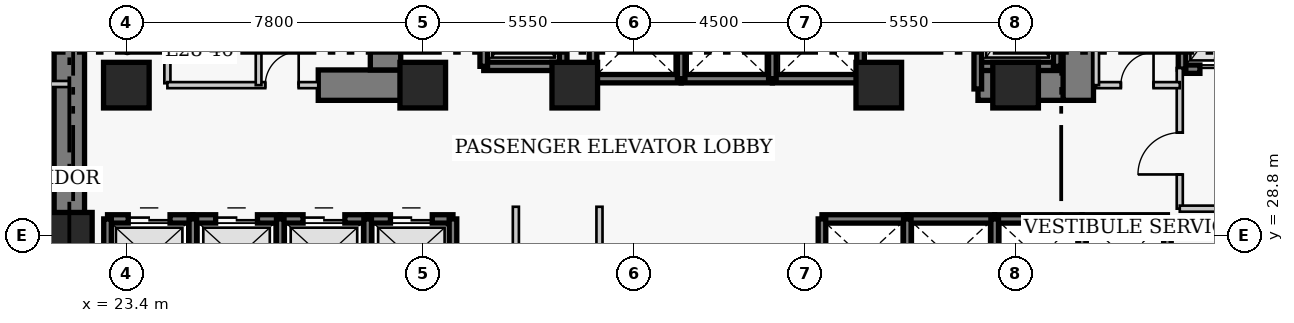
"""IFC4 building model, lengths in metres.
Left out: names, types, materials, properties, quantities, classifications, styles, units other than length and angle.
Written with IfcOpenShell. Run it as: python <this file> out.ifc"""

import sys

from ifc_helpers import new_model, si_unit, direction, frame, frame_2d, origin, origin_2d, place, context, subcontext, project, spatial, rectangle, extrude, element, fill, save


model = new_model("IFC4")
c1 = context("Model", 3, precision=1e-05, world=origin(), true_north=direction((0.0, 1.0)))
c2 = subcontext(c1, "Body", "Model", "MODEL_VIEW")
j1 = project(units=[si_unit("LENGTHUNIT", "METRE"), si_unit("PLANEANGLEUNIT", "RADIAN")], contexts=[c1])
p1 = place(None, origin())
s1 = spatial("IfcSite", under=j1, at=p1, CompositionType="ELEMENT")
p2 = place(p1, origin())
s2 = spatial("IfcBuilding", under=s1, at=p2, CompositionType="ELEMENT")
p3 = place(p2, frame((0.0, 0.0, 114.6)))
s3 = spatial("IfcBuildingStorey", under=s2, at=p3, CompositionType="ELEMENT", Elevation=114.6)
p4 = place(p3, frame((21.9, 27.05, 0.0), z_axis=(0.0, 0.0, 1.0), x_axis=(0.0, 1.0, 0.0)))
e1 = element("IfcWall", 1, at=p4, inside=s3, PredefinedType="SHEAR", context=c2, shape_type="SweptSolid", body=[
    extrude(rectangle(XDim=13.67, YDim=0.8, at=frame_2d((6.835, 0.0))), origin(), (0.0, 0.0, 1.0), 3.8),
])
p5 = place(p3, frame((28.45, 32.75, 0.0), z_axis=(0.0, 0.0, 1.0), x_axis=(1.0, 0.0, 0.0)))
e2 = element("IfcWall", 2, at=p5, inside=s3, PredefinedType="SHEAR", context=c2, shape_type="SweptSolid", body=[
    extrude(rectangle(XDim=2.4, YDim=0.8, at=frame_2d((1.2, 0.0))), origin(), (0.0, 0.0, 1.0), 3.8),
])
p6 = place(p3, frame((45.81, 32.75, 0.0), z_axis=(0.0, 0.0, 1.0), x_axis=(1.0, 0.0, 0.0)))
e3 = element("IfcWall", 3, at=p6, inside=s3, PredefinedType="SHEAR", context=c2, shape_type="SweptSolid", body=[
    extrude(rectangle(XDim=2.64, YDim=0.8, at=frame_2d((1.32, 0.0))), origin(), (0.0, 0.0, 1.0), 3.8),
])
p7 = place(p3, frame((30.22, 33.15, 0.0), z_axis=(0.0, 0.0, 1.0), x_axis=(0.0, 1.0, 0.0)))
e4 = element("IfcWall", 4, at=p7, inside=s3, PredefinedType="SHEAR", context=c2, shape_type="SweptSolid", body=[
    extrude(rectangle(XDim=7.17, YDim=0.8, at=frame_2d((3.585, 0.0))), origin(), (0.0, 0.0, 1.0), 3.8),
])
p8 = place(p3, frame((48.45, 32.35, 0.0), z_axis=(0.0, 0.0, 1.0), x_axis=(0.0, 1.0, 0.0)))
e5 = element("IfcWall", 5, at=p8, inside=s3, PredefinedType="SHEAR", context=c2, shape_type="SweptSolid", body=[
    extrude(rectangle(XDim=7.97, YDim=0.8, at=frame_2d((3.985, 0.0))), origin(), (0.0, 0.0, 1.0), 3.8),
])
p9 = place(p8, frame((5.85, 0.0, 0.0)))
e6 = element("IfcOpeningElement", 6, at=p9, cuts=e5, PredefinedType="OPENING", context=c2, shape_type="SweptSolid", body=[
    extrude(rectangle(XDim=1.1, YDim=2.15, at=frame_2d((0.55, 1.075))), frame((0.0, 0.41, 0.0), z_axis=(0.0, -1.0, 0.0), x_axis=(1.0, 0.0, 0.0)), (0.0, 0.0, 1.0), 0.82),
])
for number, where, z_axis, x_axis in (
    (7, (21.9, 28.8, 0.0), (0.0, 0.0, 1.0), (1.0, 0.0, 0.0)),
    (8, (23.4, 32.75, 0.0), (0.0, 0.0, 1.0), (1.0, 0.0, 0.0)),
    (9, (31.2, 32.75, 0.0), (0.0, 0.0, 1.0), (1.0, 0.0, 0.0)),
    (10, (35.2, 32.75, 0.0), (0.0, 0.0, 1.0), (1.0, 0.0, 0.0)),
    (11, (43.2, 32.75, 0.0), (0.0, 0.0, 1.0), (1.0, 0.0, 0.0)),
    (12, (46.8, 32.75, 0.0), (0.0, 0.0, 1.0), (1.0, 0.0, 0.0)),
):
    element("IfcColumn", number, at=place(p3, frame(where, z_axis=z_axis, x_axis=x_axis)), inside=s3, PredefinedType="COLUMN", context=c2, shape_type="SweptSolid", body=[
        extrude(rectangle(XDim=1.2, YDim=1.2, at=origin_2d()), origin(), (0.0, 0.0, 1.0), 3.8),
    ])
p10 = place(p3, frame((22.905, 29.23, 0.0), z_axis=(0.0, 0.0, 1.0), x_axis=(1.0, 0.0, 0.0)))
e13 = element("IfcWall", 13, at=p10, inside=s3, PredefinedType="SHEAR", context=c2, shape_type="SweptSolid", body=[
    extrude(rectangle(XDim=2.245, YDim=0.22, at=frame_2d((1.123, 0.0))), origin(), (0.0, 0.0, 1.0), 3.8),
])
p11 = place(p10, frame((0.545, 0.0, 0.0)))
e14 = element("IfcOpeningElement", 14, at=p11, cuts=e13, PredefinedType="OPENING", context=c2, shape_type="SweptSolid", body=[
    extrude(rectangle(XDim=1.1, YDim=2.15, at=frame_2d((0.55, 1.075))), frame((0.0, 0.12, 0.0), z_axis=(0.0, -1.0, 0.0), x_axis=(1.0, 0.0, 0.0)), (0.0, 0.0, 1.0), 0.24),
])
p12 = place(p3, frame((22.905, 27.17, 0.0), z_axis=(0.0, 0.0, 1.0), x_axis=(0.0, 1.0, 0.0)))
e15 = element("IfcWall", 15, at=p12, inside=s3, PredefinedType="SHEAR", context=c2, shape_type="SweptSolid", body=[
    extrude(rectangle(XDim=2.06, YDim=0.2, at=frame_2d((1.03, 0.0))), origin(), (0.0, 0.0, 1.0), 3.8),
])
p13 = place(p3, frame((25.15, 29.23, 0.0), z_axis=(0.0, 0.0, 1.0), x_axis=(1.0, 0.0, 0.0)))
e16 = element("IfcWall", 16, at=p13, inside=s3, PredefinedType="SHEAR", context=c2, shape_type="SweptSolid", body=[
    extrude(rectangle(XDim=2.3, YDim=0.22, at=frame_2d((1.15, 0.0))), origin(), (0.0, 0.0, 1.0), 3.8),
])
p14 = place(p13, frame((0.6, 0.0, 0.0)))
e17 = element("IfcOpeningElement", 17, at=p14, cuts=e16, PredefinedType="OPENING", context=c2, shape_type="SweptSolid", body=[
    extrude(rectangle(XDim=1.1, YDim=2.15, at=frame_2d((0.55, 1.075))), frame((0.0, 0.12, 0.0), z_axis=(0.0, -1.0, 0.0), x_axis=(1.0, 0.0, 0.0)), (0.0, 0.0, 1.0), 0.24),
])
p15 = place(p3, frame((25.15, 27.17, 0.0), z_axis=(0.0, 0.0, 1.0), x_axis=(0.0, 1.0, 0.0)))
e18 = element("IfcWall", 18, at=p15, inside=s3, PredefinedType="SHEAR", context=c2, shape_type="SweptSolid", body=[
    extrude(rectangle(XDim=2.06, YDim=0.2, at=frame_2d((1.03, 0.0))), origin(), (0.0, 0.0, 1.0), 3.8),
])
p16 = place(p3, frame((27.45, 29.23, 0.0), z_axis=(0.0, 0.0, 1.0), x_axis=(1.0, 0.0, 0.0)))
e19 = element("IfcWall", 19, at=p16, inside=s3, PredefinedType="SHEAR", context=c2, shape_type="SweptSolid", body=[
    extrude(rectangle(XDim=2.3, YDim=0.22, at=frame_2d((1.15, 0.0))), origin(), (0.0, 0.0, 1.0), 3.8),
])
p17 = place(p16, frame((0.6, 0.0, 0.0)))
e20 = element("IfcOpeningElement", 20, at=p17, cuts=e19, PredefinedType="OPENING", context=c2, shape_type="SweptSolid", body=[
    extrude(rectangle(XDim=1.1, YDim=2.15, at=frame_2d((0.55, 1.075))), frame((0.0, 0.12, 0.0), z_axis=(0.0, -1.0, 0.0), x_axis=(1.0, 0.0, 0.0)), (0.0, 0.0, 1.0), 0.24),
])
p18 = place(p3, frame((27.45, 27.17, 0.0), z_axis=(0.0, 0.0, 1.0), x_axis=(0.0, 1.0, 0.0)))
e21 = element("IfcWall", 21, at=p18, inside=s3, PredefinedType="SHEAR", context=c2, shape_type="SweptSolid", body=[
    extrude(rectangle(XDim=2.06, YDim=0.2, at=frame_2d((1.03, 0.0))), origin(), (0.0, 0.0, 1.0), 3.8),
])
p19 = place(p3, frame((29.75, 29.23, 0.0), z_axis=(0.0, 0.0, 1.0), x_axis=(1.0, 0.0, 0.0)))
e22 = element("IfcWall", 22, at=p19, inside=s3, PredefinedType="SHEAR", context=c2, shape_type="SweptSolid", body=[
    extrude(rectangle(XDim=2.245, YDim=0.22, at=frame_2d((1.123, 0.0))), origin(), (0.0, 0.0, 1.0), 3.8),
])
p20 = place(p19, frame((0.6, 0.0, 0.0)))
e23 = element("IfcOpeningElement", 23, at=p20, cuts=e22, PredefinedType="OPENING", context=c2, shape_type="SweptSolid", body=[
    extrude(rectangle(XDim=1.1, YDim=2.15, at=frame_2d((0.55, 1.075))), frame((0.0, 0.12, 0.0), z_axis=(0.0, -1.0, 0.0), x_axis=(1.0, 0.0, 0.0)), (0.0, 0.0, 1.0), 0.24),
])
for number, where, z_axis, x_axis in (
    (24, (29.75, 27.17, 0.0), (0.0, 0.0, 1.0), (0.0, 1.0, 0.0)),
    (25, (31.995, 27.17, 0.0), (0.0, 0.0, 1.0), (0.0, 1.0, 0.0)),
):
    element("IfcWall", number, at=place(p3, frame(where, z_axis=z_axis, x_axis=x_axis)), inside=s3, PredefinedType="SHEAR", context=c2, shape_type="SweptSolid", body=[
        extrude(rectangle(XDim=2.06, YDim=0.2, at=frame_2d((1.03, 0.0))), origin(), (0.0, 0.0, 1.0), 3.8),
    ])
p21 = place(p3, frame((41.705, 29.23, 0.0), z_axis=(0.0, 0.0, 1.0), x_axis=(1.0, 0.0, 0.0)))
e26 = element("IfcWall", 26, at=p21, inside=s3, PredefinedType="SHEAR", context=c2, shape_type="SweptSolid", body=[
    extrude(rectangle(XDim=2.245, YDim=0.22, at=frame_2d((1.123, 0.0))), origin(), (0.0, 0.0, 1.0), 3.8),
])
p22 = place(p3, frame((41.705, 27.17, 0.0), z_axis=(0.0, 0.0, 1.0), x_axis=(0.0, 1.0, 0.0)))
e27 = element("IfcWall", 27, at=p22, inside=s3, PredefinedType="SHEAR", context=c2, shape_type="SweptSolid", body=[
    extrude(rectangle(XDim=2.06, YDim=0.2, at=frame_2d((1.03, 0.0))), origin(), (0.0, 0.0, 1.0), 3.8),
])
p23 = place(p3, frame((43.95, 29.23, 0.0), z_axis=(0.0, 0.0, 1.0), x_axis=(1.0, 0.0, 0.0)))
e28 = element("IfcWall", 28, at=p23, inside=s3, PredefinedType="SHEAR", context=c2, shape_type="SweptSolid", body=[
    extrude(rectangle(XDim=2.3, YDim=0.22, at=frame_2d((1.15, 0.0))), origin(), (0.0, 0.0, 1.0), 3.8),
])
p24 = place(p3, frame((43.95, 27.17, 0.0), z_axis=(0.0, 0.0, 1.0), x_axis=(0.0, 1.0, 0.0)))
e29 = element("IfcWall", 29, at=p24, inside=s3, PredefinedType="SHEAR", context=c2, shape_type="SweptSolid", body=[
    extrude(rectangle(XDim=2.06, YDim=0.2, at=frame_2d((1.03, 0.0))), origin(), (0.0, 0.0, 1.0), 3.8),
])
p25 = place(p3, frame((46.25, 29.23, 0.0), z_axis=(0.0, 0.0, 1.0), x_axis=(1.0, 0.0, 0.0)))
e30 = element("IfcWall", 30, at=p25, inside=s3, PredefinedType="SHEAR", context=c2, shape_type="SweptSolid", body=[
    extrude(rectangle(XDim=2.3, YDim=0.22, at=frame_2d((1.15, 0.0))), origin(), (0.0, 0.0, 1.0), 3.8),
])
p26 = place(p3, frame((46.25, 27.17, 0.0), z_axis=(0.0, 0.0, 1.0), x_axis=(0.0, 1.0, 0.0)))
e31 = element("IfcWall", 31, at=p26, inside=s3, PredefinedType="SHEAR", context=c2, shape_type="SweptSolid", body=[
    extrude(rectangle(XDim=2.06, YDim=0.2, at=frame_2d((1.03, 0.0))), origin(), (0.0, 0.0, 1.0), 3.8),
])
p27 = place(p3, frame((48.55, 29.23, 0.0), z_axis=(0.0, 0.0, 1.0), x_axis=(1.0, 0.0, 0.0)))
e32 = element("IfcWall", 32, at=p27, inside=s3, PredefinedType="SHEAR", context=c2, shape_type="SweptSolid", body=[
    extrude(rectangle(XDim=2.245, YDim=0.22, at=frame_2d((1.123, 0.0))), origin(), (0.0, 0.0, 1.0), 3.8),
])
for number, where, z_axis, x_axis in (
    (33, (48.55, 27.17, 0.0), (0.0, 0.0, 1.0), (0.0, 1.0, 0.0)),
    (34, (50.795, 27.17, 0.0), (0.0, 0.0, 1.0), (0.0, 1.0, 0.0)),
):
    element("IfcWall", number, at=place(p3, frame(where, z_axis=z_axis, x_axis=x_axis)), inside=s3, PredefinedType="SHEAR", context=c2, shape_type="SweptSolid", body=[
        extrude(rectangle(XDim=2.06, YDim=0.2, at=frame_2d((1.03, 0.0))), origin(), (0.0, 0.0, 1.0), 3.8),
    ])
p28 = place(p3, frame((35.68, 32.92, 0.0), z_axis=(0.0, 0.0, 1.0), x_axis=(1.0, 0.0, 0.0)))
e35 = element("IfcWall", 35, at=p28, inside=s3, PredefinedType="SHEAR", context=c2, shape_type="SweptSolid", body=[
    extrude(rectangle(XDim=2.32, YDim=0.22, at=frame_2d((1.16, 0.0))), origin(), (0.0, 0.0, 1.0), 3.8),
])
p29 = place(p3, frame((35.68, 32.92, 0.0), z_axis=(0.0, 0.0, 1.0), x_axis=(0.0, 1.0, 0.0)))
e36 = element("IfcWall", 36, at=p29, inside=s3, PredefinedType="SHEAR", context=c2, shape_type="SweptSolid", body=[
    extrude(rectangle(XDim=2.16, YDim=0.2, at=frame_2d((1.08, 0.0))), origin(), (0.0, 0.0, 1.0), 3.8),
])
p30 = place(p3, frame((38.0, 32.92, 0.0), z_axis=(0.0, 0.0, 1.0), x_axis=(1.0, 0.0, 0.0)))
e37 = element("IfcWall", 37, at=p30, inside=s3, PredefinedType="SHEAR", context=c2, shape_type="SweptSolid", body=[
    extrude(rectangle(XDim=2.4, YDim=0.22, at=frame_2d((1.2, 0.0))), origin(), (0.0, 0.0, 1.0), 3.8),
])
p31 = place(p3, frame((38.0, 32.92, 0.0), z_axis=(0.0, 0.0, 1.0), x_axis=(0.0, 1.0, 0.0)))
e38 = element("IfcWall", 38, at=p31, inside=s3, PredefinedType="SHEAR", context=c2, shape_type="SweptSolid", body=[
    extrude(rectangle(XDim=2.16, YDim=0.2, at=frame_2d((1.08, 0.0))), origin(), (0.0, 0.0, 1.0), 3.8),
])
p32 = place(p3, frame((40.4, 32.92, 0.0), z_axis=(0.0, 0.0, 1.0), x_axis=(1.0, 0.0, 0.0)))
e39 = element("IfcWall", 39, at=p32, inside=s3, PredefinedType="SHEAR", context=c2, shape_type="SweptSolid", body=[
    extrude(rectangle(XDim=2.32, YDim=0.22, at=frame_2d((1.16, 0.0))), origin(), (0.0, 0.0, 1.0), 3.8),
])
for number, where, z_axis, x_axis in (
    (40, (40.4, 32.92, 0.0), (0.0, 0.0, 1.0), (0.0, 1.0, 0.0)),
    (41, (42.72, 32.92, 0.0), (0.0, 0.0, 1.0), (0.0, 1.0, 0.0)),
):
    element("IfcWall", number, at=place(p3, frame(where, z_axis=z_axis, x_axis=x_axis)), inside=s3, PredefinedType="SHEAR", context=c2, shape_type="SweptSolid", body=[
        extrude(rectangle(XDim=2.16, YDim=0.2, at=frame_2d((1.08, 0.0))), origin(), (0.0, 0.0, 1.0), 3.8),
    ])
p33 = place(p3, frame((51.18, 33.17, 0.0), z_axis=(0.0, 0.0, 1.0), x_axis=(1.0, 0.0, 0.0)))
e42 = element("IfcWall", 42, at=p33, inside=s3, PredefinedType="SHEAR", context=c2, shape_type="SweptSolid", body=[
    extrude(rectangle(XDim=2.42, YDim=0.22, at=frame_2d((1.21, 0.0))), origin(), (0.0, 0.0, 1.0), 3.8),
])
p34 = place(p33, frame((0.47, 0.0, 0.0)))
e43 = element("IfcOpeningElement", 43, at=p34, cuts=e42, PredefinedType="OPENING", context=c2, shape_type="SweptSolid", body=[
    extrude(rectangle(XDim=1.3, YDim=2.15, at=frame_2d((0.65, 1.075))), frame((0.0, 0.12, 0.0), z_axis=(0.0, -1.0, 0.0), x_axis=(1.0, 0.0, 0.0)), (0.0, 0.0, 1.0), 0.24),
])
p35 = place(p3, frame((51.18, 33.17, 0.0), z_axis=(0.0, 0.0, 1.0), x_axis=(0.0, 1.0, 0.0)))
e44 = element("IfcWall", 44, at=p35, inside=s3, PredefinedType="SHEAR", context=c2, shape_type="SweptSolid", body=[
    extrude(rectangle(XDim=2.86, YDim=0.2, at=frame_2d((1.43, 0.0))), origin(), (0.0, 0.0, 1.0), 3.8),
])
p36 = place(p3, frame((32.805, 33.245, 0.0), z_axis=(0.0, 0.0, 1.0), x_axis=(1.0, 0.0, 0.0)))
e45 = element("IfcWall", 45, at=p36, inside=s3, PredefinedType="SHEAR", context=c2, shape_type="SweptSolid", body=[
    extrude(rectangle(XDim=2.09, YDim=0.22, at=frame_2d((1.045, 0.0))), origin(), (0.0, 0.0, 1.0), 3.8),
])
for number, where, z_axis, x_axis in (
    (46, (32.805, 33.245, 0.0), (0.0, 0.0, 1.0), (0.0, 1.0, 0.0)),
    (47, (34.895, 33.245, 0.0), (0.0, 0.0, 1.0), (0.0, 1.0, 0.0)),
):
    element("IfcWall", number, at=place(p3, frame(where, z_axis=z_axis, x_axis=x_axis)), inside=s3, PredefinedType="SHEAR", context=c2, shape_type="SweptSolid", body=[
        extrude(rectangle(XDim=2.91, YDim=0.2, at=frame_2d((1.455, 0.0))), origin(), (0.0, 0.0, 1.0), 3.8),
    ])
p37 = place(p3, frame((45.805, 33.245, 0.0), z_axis=(0.0, 0.0, 1.0), x_axis=(1.0, 0.0, 0.0)))
e48 = element("IfcWall", 48, at=p37, inside=s3, PredefinedType="SHEAR", context=c2, shape_type="SweptSolid", body=[
    extrude(rectangle(XDim=2.09, YDim=0.22, at=frame_2d((1.045, 0.0))), origin(), (0.0, 0.0, 1.0), 3.8),
])
p38 = place(p3, frame((45.805, 32.65, 0.0), z_axis=(0.0, 0.0, 1.0), x_axis=(0.0, 1.0, 0.0)))
e49 = element("IfcWall", 49, at=p38, inside=s3, PredefinedType="SHEAR", context=c2, shape_type="SweptSolid", body=[
    extrude(rectangle(XDim=3.505, YDim=0.2, at=frame_2d((1.752, 0.0))), origin(), (0.0, 0.0, 1.0), 3.8),
])
p39 = place(p3, frame((47.895, 33.245, 0.0), z_axis=(0.0, 0.0, 1.0), x_axis=(0.0, 1.0, 0.0)))
e50 = element("IfcWall", 50, at=p39, inside=s3, PredefinedType="SHEAR", context=c2, shape_type="SweptSolid", body=[
    extrude(rectangle(XDim=2.91, YDim=0.2, at=frame_2d((1.455, 0.0))), origin(), (0.0, 0.0, 1.0), 3.8),
])
p40 = place(p3, frame((24.48, 32.8, 0.0), z_axis=(0.0, 0.0, 1.0), x_axis=(0.0, 1.0, 0.0)))
e51 = element("IfcWall", 51, at=p40, inside=s3, PredefinedType="PARTITIONING", context=c2, shape_type="SweptSolid", body=[
    extrude(rectangle(XDim=3.57, YDim=0.16, at=frame_2d((1.785, 0.0))), origin(), (0.0, 0.0, 1.0), 3.54),
])
p41 = place(p40, frame((1.604, 0.0, 0.0)))
e52 = element("IfcOpeningElement", 52, at=p41, cuts=e51, PredefinedType="OPENING", context=c2, shape_type="SweptSolid", body=[
    extrude(rectangle(XDim=0.9, YDim=2.1, at=frame_2d((0.45, 1.05))), frame((0.0, 0.09, 0.0), z_axis=(0.0, -1.0, 0.0), x_axis=(1.0, 0.0, 0.0)), (0.0, 0.0, 1.0), 0.18),
])
p42 = place(p3, frame((51.12, 29.5, 0.0), z_axis=(0.0, 0.0, 1.0), x_axis=(0.0, 1.0, 0.0)))
e53 = element("IfcWall", 53, at=p42, inside=s3, PredefinedType="PARTITIONING", context=c2, shape_type="SweptSolid", body=[
    extrude(rectangle(XDim=3.7, YDim=0.16, at=frame_2d((1.85, 0.0))), origin(), (0.0, 0.0, 1.0), 3.54),
])
p43 = place(p42, frame((0.9, 0.0, 0.0)))
e54 = element("IfcOpeningElement", 54, at=p43, cuts=e53, PredefinedType="OPENING", context=c2, shape_type="SweptSolid", body=[
    extrude(rectangle(XDim=1.1, YDim=2.15, at=frame_2d((0.55, 1.075))), frame((0.0, 0.09, 0.0), z_axis=(0.0, -1.0, 0.0), x_axis=(1.0, 0.0, 0.0)), (0.0, 0.0, 1.0), 0.18),
])
p44 = place(p3, frame((51.12, 29.5, 0.0), z_axis=(0.0, 0.0, 1.0), x_axis=(1.0, 0.0, 0.0)))
e55 = element("IfcWall", 55, at=p44, inside=s3, PredefinedType="PARTITIONING", context=c2, shape_type="SweptSolid", body=[
    extrude(rectangle(XDim=5.63, YDim=0.16, at=frame_2d((2.815, 0.0))), origin(), (0.0, 0.0, 1.0), 3.54),
])
p45 = place(p3, frame((24.48, 32.75, 0.0), z_axis=(0.0, 0.0, 1.0), x_axis=(1.0, 0.0, 0.0)))
e56 = element("IfcWall", 56, at=p45, inside=s3, PredefinedType="PARTITIONING", context=c2, shape_type="SweptSolid", body=[
    extrude(rectangle(XDim=3.97, YDim=0.16, at=frame_2d((1.985, 0.0))), origin(), (0.0, 0.0, 1.0), 3.54),
])
p46 = place(p45, frame((2.575, 0.0, 0.0)))
e57 = element("IfcOpeningElement", 57, at=p46, cuts=e56, PredefinedType="OPENING", context=c2, shape_type="SweptSolid", body=[
    extrude(rectangle(XDim=0.88, YDim=2.05, at=frame_2d((0.44, 1.025))), frame((0.0, 0.09, 0.0), z_axis=(0.0, -1.0, 0.0), x_axis=(1.0, 0.0, 0.0)), (0.0, 0.0, 1.0), 0.18),
])
p47 = place(p3, frame((48.92, 32.75, 0.0), z_axis=(0.0, 0.0, 1.0), x_axis=(1.0, 0.0, 0.0)))
e58 = element("IfcWall", 58, at=p47, inside=s3, PredefinedType="PARTITIONING", context=c2, shape_type="SweptSolid", body=[
    extrude(rectangle(XDim=2.2, YDim=0.16, at=frame_2d((1.1, 0.0))), origin(), (0.0, 0.0, 1.0), 3.54),
])
p48 = place(p47, frame((0.65, 0.0, 0.0)))
e59 = element("IfcOpeningElement", 59, at=p48, cuts=e58, PredefinedType="OPENING", context=c2, shape_type="SweptSolid", body=[
    extrude(rectangle(XDim=0.86, YDim=2.05, at=frame_2d((0.43, 1.025))), frame((0.0, 0.09, 0.0), z_axis=(0.0, -1.0, 0.0), x_axis=(1.0, 0.0, 0.0)), (0.0, 0.0, 1.0), 0.18),
])
for number, where, z_axis, x_axis in (
    (60, (48.92, 32.75, 0.0), (0.0, 0.0, 1.0), (0.0, 1.0, 0.0)),
    (61, (26.88, 32.75, 0.0), (0.0, 0.0, 1.0), (0.0, 1.0, 0.0)),
):
    element("IfcWall", number, at=place(p3, frame(where, z_axis=z_axis, x_axis=x_axis)), inside=s3, PredefinedType="PARTITIONING", context=c2, shape_type="SweptSolid", body=[
        extrude(rectangle(XDim=3.62, YDim=0.15, at=frame_2d((1.81, 0.0))), origin(), (0.0, 0.0, 1.0), 3.54),
    ])
for number, where, z_axis, x_axis in (
    (62, (33.65, 24.66, 0.0), (0.0, 0.0, 1.0), (0.0, 1.0, 0.0)),
    (63, (35.85, 24.66, 0.0), (0.0, 0.0, 1.0), (0.0, 1.0, 0.0)),
):
    element("IfcWall", number, at=place(p3, frame(where, z_axis=z_axis, x_axis=x_axis)), inside=s3, PredefinedType="PARTITIONING", context=c2, shape_type="SweptSolid", body=[
        extrude(rectangle(XDim=4.89, YDim=0.16, at=frame_2d((2.445, 0.0))), origin(), (0.0, 0.0, 1.0), 3.54),
    ])
p49 = place(p3, frame((19.41, 32.78, 0.0), z_axis=(0.0, 0.0, 1.0), x_axis=(1.0, 0.0, 0.0)))
e64 = element("IfcWall", 64, at=p49, inside=s3, PredefinedType="PARTITIONING", context=c2, shape_type="SweptSolid", body=[
    extrude(rectangle(XDim=2.49, YDim=0.16, at=frame_2d((1.245, 0.0))), origin(), (0.0, 0.0, 1.0), 3.54),
])
p50 = place(p11, origin())
e65 = element("IfcDoor", 65, at=p50, inside=s3, OperationType="DOUBLE_DOOR_SLIDING", PredefinedType="DOOR", context=c2, shape_type="SweptSolid", body=[
    extrude(rectangle(XDim=1.1, YDim=2.15, at=frame_2d((0.55, 1.075))), frame((0.0, 0.025, 0.0), z_axis=(0.0, -1.0, 0.0), x_axis=(1.0, 0.0, 0.0)), (0.0, 0.0, 1.0), 0.05),
])
fill(e14, e65)
p51 = place(p14, origin())
e66 = element("IfcDoor", 66, at=p51, inside=s3, OperationType="DOUBLE_DOOR_SLIDING", PredefinedType="DOOR", context=c2, shape_type="SweptSolid", body=[
    extrude(rectangle(XDim=1.1, YDim=2.15, at=frame_2d((0.55, 1.075))), frame((0.0, 0.025, 0.0), z_axis=(0.0, -1.0, 0.0), x_axis=(1.0, 0.0, 0.0)), (0.0, 0.0, 1.0), 0.05),
])
fill(e17, e66)
p52 = place(p17, origin())
e67 = element("IfcDoor", 67, at=p52, inside=s3, OperationType="DOUBLE_DOOR_SLIDING", PredefinedType="DOOR", context=c2, shape_type="SweptSolid", body=[
    extrude(rectangle(XDim=1.1, YDim=2.15, at=frame_2d((0.55, 1.075))), frame((0.0, 0.025, 0.0), z_axis=(0.0, -1.0, 0.0), x_axis=(1.0, 0.0, 0.0)), (0.0, 0.0, 1.0), 0.05),
])
fill(e20, e67)
p53 = place(p20, origin())
e68 = element("IfcDoor", 68, at=p53, inside=s3, OperationType="DOUBLE_DOOR_SLIDING", PredefinedType="DOOR", context=c2, shape_type="SweptSolid", body=[
    extrude(rectangle(XDim=1.1, YDim=2.15, at=frame_2d((0.55, 1.075))), frame((0.0, 0.025, 0.0), z_axis=(0.0, -1.0, 0.0), x_axis=(1.0, 0.0, 0.0)), (0.0, 0.0, 1.0), 0.05),
])
fill(e23, e68)
p54 = place(p34, origin())
e69 = element("IfcDoor", 69, at=p54, inside=s3, OperationType="DOUBLE_DOOR_SLIDING", PredefinedType="DOOR", context=c2, shape_type="SweptSolid", body=[
    extrude(rectangle(XDim=1.3, YDim=2.15, at=frame_2d((0.65, 1.075))), frame((0.0, 0.025, 0.0), z_axis=(0.0, -1.0, 0.0), x_axis=(1.0, 0.0, 0.0)), (0.0, 0.0, 1.0), 0.05),
])
fill(e43, e69)
p55 = place(p43, origin())
e70 = element("IfcDoor", 70, at=p55, inside=s3, OperationType="SINGLE_SWING_LEFT", PredefinedType="DOOR", context=c2, shape_type="SweptSolid", body=[
    extrude(rectangle(XDim=1.1, YDim=2.15, at=frame_2d((0.55, 1.075))), frame((0.0, 0.025, 0.0), z_axis=(0.0, -1.0, 0.0), x_axis=(1.0, 0.0, 0.0)), (0.0, 0.0, 1.0), 0.05),
])
fill(e54, e70)
p56 = place(p46, origin())
e71 = element("IfcDoor", 71, at=p56, inside=s3, OperationType="SINGLE_SWING_RIGHT", PredefinedType="DOOR", context=c2, shape_type="SweptSolid", body=[
    extrude(rectangle(XDim=0.88, YDim=2.05, at=frame_2d((0.44, 1.025))), frame((0.0, 0.025, 0.0), z_axis=(0.0, -1.0, 0.0), x_axis=(1.0, 0.0, 0.0)), (0.0, 0.0, 1.0), 0.05),
])
fill(e57, e71)
p57 = place(p48, origin())
e72 = element("IfcDoor", 72, at=p57, inside=s3, OperationType="SINGLE_SWING_RIGHT", PredefinedType="DOOR", context=c2, shape_type="SweptSolid", body=[
    extrude(rectangle(XDim=0.86, YDim=2.05, at=frame_2d((0.43, 1.025))), frame((0.0, 0.025, 0.0), z_axis=(0.0, -1.0, 0.0), x_axis=(1.0, 0.0, 0.0)), (0.0, 0.0, 1.0), 0.05),
])
fill(e59, e72)
save(model, sys.argv[1])
